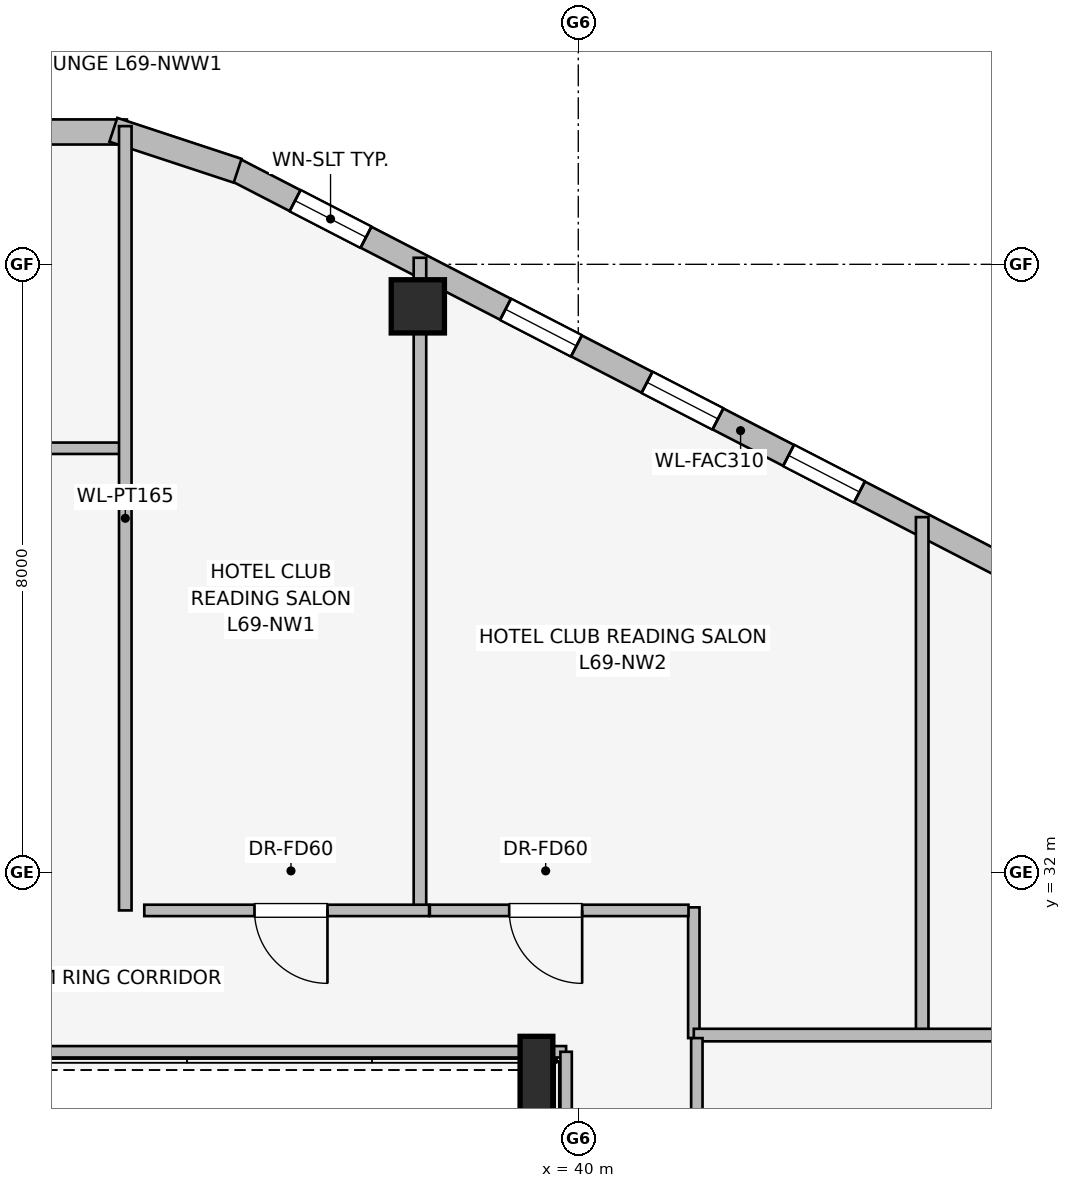
"""IFC4 building model, lengths in metres.
Left out: names, types, materials, properties, quantities, classifications, styles, units other than length and angle.
Written with IfcOpenShell. Run it as: python <this file> out.ifc"""

import sys

from ifc_helpers import new_model, si_unit, direction, frame, frame_2d, origin, origin_2d, place, context, subcontext, project, spatial, rectangle, i_section, extrude, element, fill, save


model = new_model("IFC4")
c1 = context("Model", 3, precision=1e-05, world=origin(), true_north=direction((0.0, 1.0)))
c2 = subcontext(c1, "Body", "Model", "MODEL_VIEW")
j1 = project(units=[si_unit("LENGTHUNIT", "METRE"), si_unit("PLANEANGLEUNIT", "RADIAN")], contexts=[c1])
p1 = place(None, origin())
s1 = spatial("IfcSite", under=j1, at=p1, CompositionType="ELEMENT")
p2 = place(p1, origin())
s2 = spatial("IfcBuilding", under=s1, at=p2, CompositionType="ELEMENT")
p3 = place(p2, frame((0.0, 0.0, 252.55)))
s3 = spatial("IfcBuildingStorey", under=s2, at=p3, CompositionType="ELEMENT", Elevation=252.55)
p4 = place(p3, frame((37.889, 39.447, 0.0), z_axis=(0.0, 0.0, 1.0), x_axis=(1.0, 0.0, 0.0)))
e1 = element("IfcColumn", 1, at=p4, inside=s3, PredefinedType="COLUMN", context=c2, shape_type="SweptSolid", body=[
    extrude(rectangle(XDim=0.7, YDim=0.7, at=origin_2d()), origin(), (0.0, 0.0, 1.0), 3.55),
])
p5 = place(p3, frame((39.45, 29.35, 0.0), z_axis=(0.0, 0.0, 1.0), x_axis=(1.0, 0.0, 0.0)))
e2 = element("IfcColumn", 2, at=p5, inside=s3, PredefinedType="COLUMN", context=c2, shape_type="SweptSolid", body=[
    extrude(i_section(OverallWidth=0.431, OverallDepth=0.987, WebThickness=0.034, FlangeThickness=0.062, at=origin_2d()), origin(), (0.0, 0.0, 1.0), 3.55),
])
p6 = place(p3, frame((35.437, 41.27, 0.0), z_axis=(0.0, 0.0, 1.0), x_axis=(0.888581481622, -0.458718814218, 0.0)))
e3 = element("IfcWall", 3, at=p6, inside=s3, PredefinedType="STANDARD", context=c2, shape_type="SweptSolid", body=[
    extrude(rectangle(XDim=15.077, YDim=0.31, at=frame_2d((7.539, 0.0))), origin(), (0.0, 0.0, 1.0), 3.29),
])
p7 = place(p6, frame((0.942, 0.0, 0.75)))
e4 = element("IfcOpeningElement", 4, at=p7, cuts=e3, PredefinedType="OPENING", context=c2, shape_type="SweptSolid", body=[
    extrude(rectangle(XDim=1.05, YDim=1.4, at=frame_2d((0.525, 0.7))), frame((0.0, 0.165, 0.0), z_axis=(0.0, -1.0, 0.0), x_axis=(1.0, 0.0, 0.0)), (0.0, 0.0, 1.0), 0.33),
])
p8 = place(p6, frame((4.058, 0.0, 0.75)))
e5 = element("IfcOpeningElement", 5, at=p8, cuts=e3, PredefinedType="OPENING", context=c2, shape_type="SweptSolid", body=[
    extrude(rectangle(XDim=1.05, YDim=1.4, at=frame_2d((0.525, 0.7))), frame((0.0, 0.165, 0.0), z_axis=(0.0, -1.0, 0.0), x_axis=(1.0, 0.0, 0.0)), (0.0, 0.0, 1.0), 0.33),
])
p9 = place(p6, frame((6.153, 0.0, 0.75)))
e6 = element("IfcOpeningElement", 6, at=p9, cuts=e3, PredefinedType="OPENING", context=c2, shape_type="SweptSolid", body=[
    extrude(rectangle(XDim=1.05, YDim=1.4, at=frame_2d((0.525, 0.7))), frame((0.0, 0.165, 0.0), z_axis=(0.0, -1.0, 0.0), x_axis=(1.0, 0.0, 0.0)), (0.0, 0.0, 1.0), 0.33),
])
p10 = place(p6, frame((8.249, 0.0, 0.75)))
e7 = element("IfcOpeningElement", 7, at=p10, cuts=e3, PredefinedType="OPENING", context=c2, shape_type="SweptSolid", body=[
    extrude(rectangle(XDim=1.05, YDim=1.4, at=frame_2d((0.525, 0.7))), frame((0.0, 0.165, 0.0), z_axis=(0.0, -1.0, 0.0), x_axis=(1.0, 0.0, 0.0)), (0.0, 0.0, 1.0), 0.33),
])
p11 = place(p6, frame((13.029, 0.0, 0.75)))
e8 = element("IfcOpeningElement", 8, at=p11, cuts=e3, PredefinedType="OPENING", context=c2, shape_type="SweptSolid", body=[
    extrude(rectangle(XDim=1.05, YDim=1.4, at=frame_2d((0.525, 0.7))), frame((0.0, 0.165, 0.0), z_axis=(0.0, -1.0, 0.0), x_axis=(1.0, 0.0, 0.0)), (0.0, 0.0, 1.0), 0.33),
])
p12 = place(p3, frame((32.339, 41.741, 0.0), z_axis=(0.0, 0.0, 1.0), x_axis=(1.0, 0.0, 0.0)))
e9 = element("IfcWall", 9, at=p12, inside=s3, PredefinedType="STANDARD", context=c2, shape_type="SweptSolid", body=[
    extrude(rectangle(XDim=1.722, YDim=0.33, at=frame_2d((0.861, 0.0))), origin(), (0.0, 0.0, 1.0), 3.29),
])
p13 = place(p3, frame((33.883, 41.77, 0.0), z_axis=(0.0, 0.0, 1.0), x_axis=(0.949713440491, -0.313120393699, 0.0)))
e10 = element("IfcWall", 10, at=p13, inside=s3, PredefinedType="STANDARD", context=c2, shape_type="SweptSolid", body=[
    extrude(rectangle(XDim=1.722, YDim=0.33, at=frame_2d((0.861, 0.0))), origin(), (0.0, 0.0, 1.0), 3.29),
])
p14 = place(p3, frame((39.84, 29.64, 0.0), z_axis=(0.0, 0.0, 1.0), x_axis=(-1.0, 0.0, 0.0)))
e11 = element("IfcWall", 11, at=p14, inside=s3, PredefinedType="PARTITIONING", context=c2, shape_type="SweptSolid", body=[
    extrude(rectangle(XDim=12.203, YDim=0.15, at=frame_2d((6.102, 0.0))), origin(), (0.0, 0.0, 1.0), 2.431),
])
p15 = place(p3, frame((39.84, 18.36, 0.0), z_axis=(0.0, 0.0, 1.0), x_axis=(0.0, 1.0, 0.0)))
e12 = element("IfcWall", 12, at=p15, inside=s3, PredefinedType="PARTITIONING", context=c2, shape_type="SweptSolid", body=[
    extrude(rectangle(XDim=11.28, YDim=0.15, at=frame_2d((5.64, 0.0))), origin(), (0.0, 0.0, 1.0), 3.29),
])
p16 = place(p3, frame((34.0, 37.58, 0.0), z_axis=(0.0, 0.0, 1.0), x_axis=(-1.0, 0.0, 0.0)))
e13 = element("IfcWall", 13, at=p16, inside=s3, PredefinedType="PARTITIONING", context=c2, shape_type="SweptSolid", body=[
    extrude(rectangle(XDim=10.501, YDim=0.15, at=frame_2d((5.25, 0.0))), origin(), (0.0, 0.0, 1.0), 2.682),
])
p17 = place(p16, frame((4.879, 0.0, 0.0)))
e14 = element("IfcOpeningElement", 14, at=p17, cuts=e13, PredefinedType="OPENING", context=c2, shape_type="SweptSolid", body=[
    extrude(rectangle(XDim=0.96, YDim=2.0, at=frame_2d((0.48, 1.0))), frame((0.0, 0.085, 0.0), z_axis=(0.0, -1.0, 0.0), x_axis=(1.0, 0.0, 0.0)), (0.0, 0.0, 1.0), 0.17),
])
p18 = place(p3, frame((34.04, 31.5, 0.0), z_axis=(0.0, 0.0, 1.0), x_axis=(0.0, 1.0, 0.0)))
e15 = element("IfcWall", 15, at=p18, inside=s3, PredefinedType="PARTITIONING", context=c2, shape_type="SweptSolid", body=[
    extrude(rectangle(XDim=10.318, YDim=0.165, at=frame_2d((5.159, 0.0))), origin(), (0.0, 0.0, 1.0), 3.29),
])
p19 = place(p3, frame((41.52, 29.82, 0.0), z_axis=(0.0, 0.0, 1.0), x_axis=(0.0, 1.0, 0.0)))
e16 = element("IfcWall", 16, at=p19, inside=s3, PredefinedType="PARTITIONING", context=c2, shape_type="SweptSolid", body=[
    extrude(rectangle(XDim=1.72, YDim=0.15, at=frame_2d((0.86, 0.0))), origin(), (0.0, 0.0, 1.0), 3.29),
])
p20 = place(p3, frame((37.917, 31.51, 0.0), z_axis=(0.0, 0.0, 1.0), x_axis=(0.0, 1.0, 0.0)))
e17 = element("IfcWall", 17, at=p20, inside=s3, PredefinedType="PARTITIONING", context=c2, shape_type="SweptSolid", body=[
    extrude(rectangle(XDim=8.576, YDim=0.165, at=frame_2d((4.288, 0.0))), origin(), (0.0, 0.0, 1.0), 2.679),
])
p21 = place(p3, frame((44.525, 29.89, 0.0), z_axis=(0.0, 0.0, 1.0), x_axis=(0.0, 1.0, 0.0)))
e18 = element("IfcWall", 18, at=p21, inside=s3, PredefinedType="PARTITIONING", context=c2, shape_type="SweptSolid", body=[
    extrude(rectangle(XDim=6.784, YDim=0.165, at=frame_2d((3.392, 0.0))), origin(), (0.0, 0.0, 1.0), 3.29),
])
p22 = place(p3, frame((38.037, 31.5, 0.0), z_axis=(0.0, 0.0, 1.0), x_axis=(-1.0, 0.0, 0.0)))
e19 = element("IfcWall", 19, at=p22, inside=s3, PredefinedType="PARTITIONING", context=c2, shape_type="SweptSolid", body=[
    extrude(rectangle(XDim=3.747, YDim=0.15, at=frame_2d((1.874, 0.0))), origin(), (0.0, 0.0, 1.0), 3.29),
])
p23 = place(p22, frame((1.337, 0.0, 0.0)))
e20 = element("IfcOpeningElement", 20, at=p23, cuts=e19, PredefinedType="OPENING", context=c2, shape_type="SweptSolid", body=[
    extrude(rectangle(XDim=0.96, YDim=2.0, at=frame_2d((0.48, 1.0))), frame((0.0, 0.085, 0.0), z_axis=(0.0, -1.0, 0.0), x_axis=(1.0, 0.0, 0.0)), (0.0, 0.0, 1.0), 0.17),
])
p24 = place(p3, frame((41.45, 31.5, 0.0), z_axis=(0.0, 0.0, 1.0), x_axis=(-1.0, 0.0, 0.0)))
e21 = element("IfcWall", 21, at=p24, inside=s3, PredefinedType="PARTITIONING", context=c2, shape_type="SweptSolid", body=[
    extrude(rectangle(XDim=3.403, YDim=0.15, at=frame_2d((1.701, 0.0))), origin(), (0.0, 0.0, 1.0), 3.29),
])
p25 = place(p24, frame((1.399, 0.0, 0.0)))
e22 = element("IfcOpeningElement", 22, at=p25, cuts=e21, PredefinedType="OPENING", context=c2, shape_type="SweptSolid", body=[
    extrude(rectangle(XDim=0.96, YDim=2.0, at=frame_2d((0.48, 1.0))), frame((0.0, 0.085, 0.0), z_axis=(0.0, -1.0, 0.0), x_axis=(1.0, 0.0, 0.0)), (0.0, 0.0, 1.0), 0.17),
])
p26 = place(p3, frame((41.52, 29.86, 0.0), z_axis=(0.0, 0.0, 1.0), x_axis=(1.0, 0.0, 0.0)))
e23 = element("IfcWall", 23, at=p26, inside=s3, PredefinedType="PARTITIONING", context=c2, shape_type="SweptSolid", body=[
    extrude(rectangle(XDim=9.623, YDim=0.165, at=frame_2d((4.812, 0.0))), origin(), (0.0, 0.0, 1.0), 3.29),
])
p27 = place(p3, frame((41.56, 23.785, 0.0), z_axis=(0.0, 0.0, 1.0), x_axis=(0.0, 1.0, 0.0)))
e24 = element("IfcWall", 24, at=p27, inside=s3, PredefinedType="PARTITIONING", context=c2, shape_type="SweptSolid", body=[
    extrude(rectangle(XDim=6.035, YDim=0.15, at=frame_2d((3.018, 0.0))), origin(), (0.0, 0.0, 1.0), 3.29),
])
p28 = place(p27, frame((3.638, 0.0, 0.0)))
e25 = element("IfcOpeningElement", 25, at=p28, cuts=e24, PredefinedType="OPENING", context=c2, shape_type="SweptSolid", body=[
    extrude(rectangle(XDim=0.96, YDim=2.0, at=frame_2d((0.48, 1.0))), frame((0.0, 0.085, 0.0), z_axis=(0.0, -1.0, 0.0), x_axis=(1.0, 0.0, 0.0)), (0.0, 0.0, 1.0), 0.17),
])
p29 = place(p7, origin())
e26 = element("IfcWindow", 26, at=p29, inside=s3, PartitioningType="SINGLE_PANEL", PredefinedType="WINDOW", context=c2, shape_type="SweptSolid", body=[
    extrude(rectangle(XDim=1.05, YDim=1.4, at=frame_2d((0.525, 0.7))), frame((0.0, 0.03, 0.0), z_axis=(0.0, -1.0, 0.0), x_axis=(1.0, 0.0, 0.0)), (0.0, 0.0, 1.0), 0.06),
])
fill(e4, e26)
p30 = place(p8, origin())
e27 = element("IfcWindow", 27, at=p30, inside=s3, PartitioningType="SINGLE_PANEL", PredefinedType="WINDOW", context=c2, shape_type="SweptSolid", body=[
    extrude(rectangle(XDim=1.05, YDim=1.4, at=frame_2d((0.525, 0.7))), frame((0.0, 0.03, 0.0), z_axis=(0.0, -1.0, 0.0), x_axis=(1.0, 0.0, 0.0)), (0.0, 0.0, 1.0), 0.06),
])
fill(e5, e27)
p31 = place(p9, origin())
e28 = element("IfcWindow", 28, at=p31, inside=s3, PartitioningType="SINGLE_PANEL", PredefinedType="WINDOW", context=c2, shape_type="SweptSolid", body=[
    extrude(rectangle(XDim=1.05, YDim=1.4, at=frame_2d((0.525, 0.7))), frame((0.0, 0.03, 0.0), z_axis=(0.0, -1.0, 0.0), x_axis=(1.0, 0.0, 0.0)), (0.0, 0.0, 1.0), 0.06),
])
fill(e6, e28)
p32 = place(p10, origin())
e29 = element("IfcWindow", 29, at=p32, inside=s3, PartitioningType="SINGLE_PANEL", PredefinedType="WINDOW", context=c2, shape_type="SweptSolid", body=[
    extrude(rectangle(XDim=1.05, YDim=1.4, at=frame_2d((0.525, 0.7))), frame((0.0, 0.03, 0.0), z_axis=(0.0, -1.0, 0.0), x_axis=(1.0, 0.0, 0.0)), (0.0, 0.0, 1.0), 0.06),
])
fill(e7, e29)
p33 = place(p23, origin())
e30 = element("IfcDoor", 30, at=p33, inside=s3, OperationType="SINGLE_SWING_LEFT", PredefinedType="DOOR", context=c2, shape_type="SweptSolid", body=[
    extrude(rectangle(XDim=0.96, YDim=2.0, at=frame_2d((0.48, 1.0))), frame((0.0, 0.025, 0.0), z_axis=(0.0, -1.0, 0.0), x_axis=(1.0, 0.0, 0.0)), (0.0, 0.0, 1.0), 0.05),
])
fill(e20, e30)
p34 = place(p25, origin())
e31 = element("IfcDoor", 31, at=p34, inside=s3, OperationType="SINGLE_SWING_LEFT", PredefinedType="DOOR", context=c2, shape_type="SweptSolid", body=[
    extrude(rectangle(XDim=0.96, YDim=2.0, at=frame_2d((0.48, 1.0))), frame((0.0, 0.025, 0.0), z_axis=(0.0, -1.0, 0.0), x_axis=(1.0, 0.0, 0.0)), (0.0, 0.0, 1.0), 0.05),
])
fill(e22, e31)
save(model, sys.argv[1])
